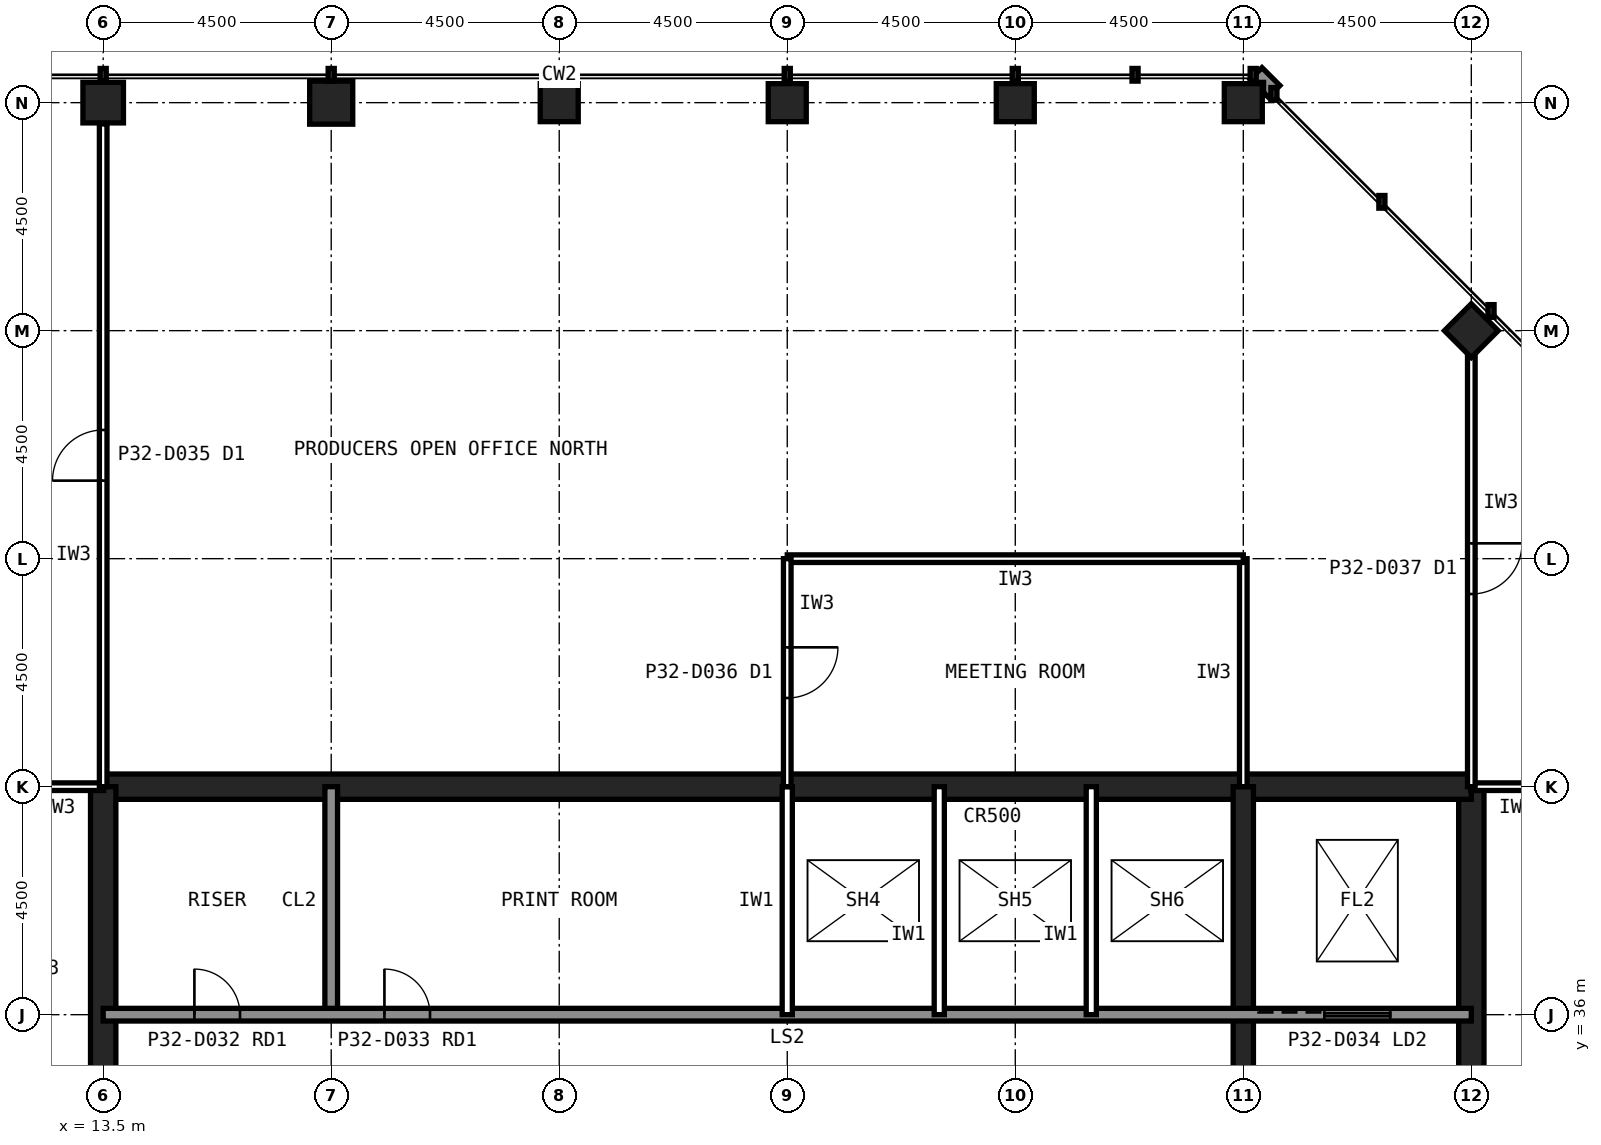
"""IFC4 building model, lengths in metres.
Left out: names, types, materials, properties, quantities, classifications, styles, units other than length and angle.
Written with IfcOpenShell. Run it as: python <this file> out.ifc"""

import sys

from ifc_helpers import new_model, si_unit, direction, frame, frame_2d, origin, origin_2d, place, context, subcontext, project, spatial, rectangle, hollow_rectangle, extrude, element, fill, save


model = new_model("IFC4")
c1 = context("Model", 3, precision=1e-05, world=origin(), true_north=direction((0.0, 1.0)))
c2 = subcontext(c1, "Body", "Model", "MODEL_VIEW")
j1 = project(units=[si_unit("LENGTHUNIT", "METRE"), si_unit("PLANEANGLEUNIT", "RADIAN")], contexts=[c1])
p1 = place(None, origin())
s1 = spatial("IfcSite", under=j1, at=p1, CompositionType="ELEMENT")
p2 = place(p1, origin())
s2 = spatial("IfcBuilding", under=s1, at=p2, CompositionType="ELEMENT")
p3 = place(p2, frame((0.0, 0.0, 135.6)))
s3 = spatial("IfcBuildingStorey", under=s2, at=p3, CompositionType="ELEMENT", Elevation=135.6)
for number, where, z_axis, x_axis in (
    (1, (36.0, 54.0, 0.0), (0.0, 0.0, 1.0), (1.0, 0.0, 0.0)),
    (2, (31.5, 54.0, 0.0), (0.0, 0.0, 1.0), (1.0, 0.0, 0.0)),
    (3, (27.0, 54.0, 0.0), (0.0, 0.0, 1.0), (1.0, 0.0, 0.0)),
    (4, (22.5, 54.0, 0.0), (0.0, 0.0, 1.0), (1.0, 0.0, 0.0)),
):
    element("IfcColumn", number, at=place(p3, frame(where, z_axis=z_axis, x_axis=x_axis)), inside=s3, PredefinedType="COLUMN", context=c2, shape_type="SweptSolid", body=[
        extrude(hollow_rectangle(XDim=0.75, YDim=0.75, WallThickness=0.04, at=origin_2d()), origin(), (0.0, 0.0, 1.0), 4.0),
    ])
p4 = place(p3, frame((18.0, 54.0, 0.0), z_axis=(0.0, 0.0, 1.0), x_axis=(1.0, 0.0, 0.0)))
e5 = element("IfcColumn", 5, at=p4, inside=s3, PredefinedType="COLUMN", context=c2, shape_type="SweptSolid", body=[
    extrude(hollow_rectangle(XDim=0.85, YDim=0.85, WallThickness=0.05, at=origin_2d()), origin(), (0.0, 0.0, 1.0), 4.0),
])
p5 = place(p3, frame((13.5, 54.0, 0.0), z_axis=(0.0, 0.0, 1.0), x_axis=(1.0, 0.0, 0.0)))
e6 = element("IfcColumn", 6, at=p5, inside=s3, PredefinedType="COLUMN", context=c2, shape_type="SweptSolid", body=[
    extrude(hollow_rectangle(XDim=0.8, YDim=0.8, WallThickness=0.045, at=origin_2d()), origin(), (0.0, 0.0, 1.0), 4.0),
])
p6 = place(p3, frame((40.5, 49.5, 0.0), z_axis=(0.0, 0.0, 1.0), x_axis=(0.707106781187, 0.707106781187, 0.0)))
e7 = element("IfcColumn", 7, at=p6, inside=s3, PredefinedType="COLUMN", context=c2, shape_type="SweptSolid", body=[
    extrude(hollow_rectangle(XDim=0.75, YDim=0.75, WallThickness=0.04, at=origin_2d()), origin(), (0.0, 0.0, 1.0), 4.0),
])
p7 = place(p3, frame((40.5, 13.5, 0.0), z_axis=(0.0, 0.0, 1.0), x_axis=(0.0, 1.0, 0.0)))
e8 = element("IfcWall", 8, at=p7, inside=s3, PredefinedType="SHEAR", context=c2, shape_type="SweptSolid", body=[
    extrude(rectangle(XDim=27.0, YDim=0.5, at=frame_2d((13.5, 0.0))), origin(), (0.0, 0.0, 1.0), 4.0),
])
p8 = place(p7, frame((5.85, 0.0, 0.0)))
e9 = element("IfcOpeningElement", 9, at=p8, cuts=e8, PredefinedType="OPENING", context=c2, shape_type="SweptSolid", body=[
    extrude(rectangle(XDim=1.8, YDim=2.1, at=frame_2d((0.9, 1.05))), frame((0.0, 0.26, 0.0), z_axis=(0.0, -1.0, 0.0), x_axis=(1.0, 0.0, 0.0)), (0.0, 0.0, 1.0), 0.52),
])
p9 = place(p7, frame((19.65, 0.0, 0.0)))
e10 = element("IfcOpeningElement", 10, at=p9, cuts=e8, PredefinedType="OPENING", context=c2, shape_type="SweptSolid", body=[
    extrude(rectangle(XDim=1.2, YDim=2.1, at=frame_2d((0.6, 1.05))), frame((0.0, 0.26, 0.0), z_axis=(0.0, -1.0, 0.0), x_axis=(1.0, 0.0, 0.0)), (0.0, 0.0, 1.0), 0.52),
])
p10 = place(p3, frame((40.5, 40.5, 0.0), z_axis=(0.0, 0.0, 1.0), x_axis=(-1.0, 0.0, 0.0)))
e11 = element("IfcWall", 11, at=p10, inside=s3, PredefinedType="SHEAR", context=c2, shape_type="SweptSolid", body=[
    extrude(rectangle(XDim=27.0, YDim=0.5, at=frame_2d((13.5, 0.0))), origin(), (0.0, 0.0, 1.0), 4.0),
])
p11 = place(p3, frame((13.5, 40.5, 0.0), z_axis=(0.0, 0.0, 1.0), x_axis=(0.0, -1.0, 0.0)))
e12 = element("IfcWall", 12, at=p11, inside=s3, PredefinedType="SHEAR", context=c2, shape_type="SweptSolid", body=[
    extrude(rectangle(XDim=27.0, YDim=0.5, at=frame_2d((13.5, 0.0))), origin(), (0.0, 0.0, 1.0), 4.0),
])
p12 = place(p11, frame((19.65, 0.0, 0.0)))
e13 = element("IfcOpeningElement", 13, at=p12, cuts=e12, PredefinedType="OPENING", context=c2, shape_type="SweptSolid", body=[
    extrude(rectangle(XDim=1.2, YDim=2.1, at=frame_2d((0.6, 1.05))), frame((0.0, 0.26, 0.0), z_axis=(0.0, -1.0, 0.0), x_axis=(1.0, 0.0, 0.0)), (0.0, 0.0, 1.0), 0.52),
])
p13 = place(p11, frame((5.85, 0.0, 0.0)))
e14 = element("IfcOpeningElement", 14, at=p13, cuts=e12, PredefinedType="OPENING", context=c2, shape_type="SweptSolid", body=[
    extrude(rectangle(XDim=1.8, YDim=2.1, at=frame_2d((0.9, 1.05))), frame((0.0, 0.26, 0.0), z_axis=(0.0, -1.0, 0.0), x_axis=(1.0, 0.0, 0.0)), (0.0, 0.0, 1.0), 0.52),
])
p14 = place(p3, frame((18.0, 36.0, 0.0), z_axis=(0.0, 0.0, 1.0), x_axis=(0.0, 1.0, 0.0)))
e15 = element("IfcWall", 15, at=p14, inside=s3, PredefinedType="SOLIDWALL", context=c2, shape_type="SweptSolid", body=[
    extrude(rectangle(XDim=4.5, YDim=0.25, at=frame_2d((2.25, 0.0))), origin(), (0.0, 0.0, 1.0), 3.84),
])
p15 = place(p3, frame((36.0, 22.5, 0.0), z_axis=(0.0, 0.0, 1.0), x_axis=(0.0, 1.0, 0.0)))
e16 = element("IfcWall", 16, at=p15, inside=s3, PredefinedType="SHEAR", context=c2, shape_type="SweptSolid", body=[
    extrude(rectangle(XDim=18.0, YDim=0.4, at=frame_2d((9.0, 0.0))), origin(), (0.0, 0.0, 1.0), 4.0),
])
p16 = place(p3, frame((13.5, 36.0, 0.0), z_axis=(0.0, 0.0, 1.0), x_axis=(1.0, 0.0, 0.0)))
e17 = element("IfcWall", 17, at=p16, inside=s3, PredefinedType="SOLIDWALL", context=c2, shape_type="SweptSolid", body=[
    extrude(rectangle(XDim=27.0, YDim=0.25, at=frame_2d((13.5, 0.0))), origin(), (0.0, 0.0, 1.0), 3.84),
])
p17 = place(p16, frame((1.8, 0.0, 0.0)))
e18 = element("IfcOpeningElement", 18, at=p17, cuts=e17, PredefinedType="OPENING", context=c2, shape_type="SweptSolid", body=[
    extrude(rectangle(XDim=0.9, YDim=2.1, at=frame_2d((0.45, 1.05))), frame((0.0, 0.135, 0.0), z_axis=(0.0, -1.0, 0.0), x_axis=(1.0, 0.0, 0.0)), (0.0, 0.0, 1.0), 0.27),
])
p18 = place(p16, frame((5.55, 0.0, 0.0)))
e19 = element("IfcOpeningElement", 19, at=p18, cuts=e17, PredefinedType="OPENING", context=c2, shape_type="SweptSolid", body=[
    extrude(rectangle(XDim=0.9, YDim=2.1, at=frame_2d((0.45, 1.05))), frame((0.0, 0.135, 0.0), z_axis=(0.0, -1.0, 0.0), x_axis=(1.0, 0.0, 0.0)), (0.0, 0.0, 1.0), 0.27),
])
p19 = place(p16, frame((8.55, 0.0, 0.0)))
e20 = element("IfcOpeningElement", 20, at=p19, cuts=e17, PredefinedType="OPENING", context=c2, shape_type="SweptSolid", body=[
    extrude(rectangle(XDim=0.9, YDim=2.1, at=frame_2d((0.45, 1.05))), frame((0.0, 0.135, 0.0), z_axis=(0.0, -1.0, 0.0), x_axis=(1.0, 0.0, 0.0)), (0.0, 0.0, 1.0), 0.27),
])
p20 = place(p16, frame((24.1, 0.0, 0.0)))
e21 = element("IfcOpeningElement", 21, at=p20, cuts=e17, PredefinedType="OPENING", context=c2, shape_type="SweptSolid", body=[
    extrude(rectangle(XDim=1.3, YDim=2.2, at=frame_2d((0.65, 1.1))), frame((0.0, 0.135, 0.0), z_axis=(0.0, -1.0, 0.0), x_axis=(1.0, 0.0, 0.0)), (0.0, 0.0, 1.0), 0.27),
])
for number, where, z_axis, x_axis in (
    (22, (21.0, 36.0, 0.0), (0.0, 0.0, 1.0), (0.0, 1.0, 0.0)),
    (23, (27.0, 36.0, 0.0), (0.0, 0.0, 1.0), (0.0, 1.0, 0.0)),
    (24, (30.0, 36.0, 0.0), (0.0, 0.0, 1.0), (0.0, 1.0, 0.0)),
    (25, (33.0, 36.0, 0.0), (0.0, 0.0, 1.0), (0.0, 1.0, 0.0)),
):
    element("IfcWall", number, at=place(p3, frame(where, z_axis=z_axis, x_axis=x_axis)), inside=s3, PredefinedType="PARTITIONING", context=c2, shape_type="SweptSolid", body=[
        extrude(rectangle(XDim=4.5, YDim=0.2, at=frame_2d((2.25, 0.0))), origin(), (0.0, 0.0, 1.0), 3.84),
    ])
p21 = place(p3, frame((22.5, 42.3, 0.0), z_axis=(0.0, 0.0, 1.0), x_axis=(-1.0, 0.0, 0.0)))
e26 = element("IfcWall", 26, at=p21, inside=s3, PredefinedType="PARTITIONING", context=c2, shape_type="SweptSolid", body=[
    extrude(rectangle(XDim=10.8, YDim=0.15, at=frame_2d((5.4, 0.0))), origin(), (0.0, 0.0, 1.0), 3.84),
])
p22 = place(p21, frame((4.9, 0.0, 0.0)))
e27 = element("IfcOpeningElement", 27, at=p22, cuts=e26, PredefinedType="OPENING", context=c2, shape_type="SweptSolid", body=[
    extrude(rectangle(XDim=1.0, YDim=2.1, at=frame_2d((0.5, 1.05))), frame((0.0, 0.085, 0.0), z_axis=(0.0, -1.0, 0.0), x_axis=(1.0, 0.0, 0.0)), (0.0, 0.0, 1.0), 0.17),
])
p23 = place(p3, frame((42.3, 40.5, 0.0), z_axis=(0.0, 0.0, 1.0), x_axis=(-1.0, 0.0, 0.0)))
e28 = element("IfcWall", 28, at=p23, inside=s3, PredefinedType="PARTITIONING", context=c2, shape_type="SweptSolid", body=[
    extrude(rectangle(XDim=1.81, YDim=0.15, at=frame_2d((0.905, 0.0))), origin(), (0.0, 0.0, 1.0), 2.989),
])
p24 = place(p3, frame((22.5, 40.5, 0.0), z_axis=(0.0, 0.0, 1.0), x_axis=(0.0, 1.0, 0.0)))
e29 = element("IfcWall", 29, at=p24, inside=s3, PredefinedType="PARTITIONING", context=c2, shape_type="SweptSolid", body=[
    extrude(rectangle(XDim=1.8, YDim=0.15, at=frame_2d((0.9, 0.0))), origin(), (0.0, 0.0, 1.0), 2.989),
])
p25 = place(p3, frame((36.0, 40.5, 0.0), z_axis=(0.0, 0.0, 1.0), x_axis=(0.0, 1.0, 0.0)))
e30 = element("IfcWall", 30, at=p25, inside=s3, PredefinedType="PARTITIONING", context=c2, shape_type="SweptSolid", body=[
    extrude(rectangle(XDim=4.5, YDim=0.15, at=frame_2d((2.25, 0.0))), origin(), (0.0, 0.0, 1.0), 2.989),
])
p26 = place(p3, frame((36.0, 45.0, 0.0), z_axis=(0.0, 0.0, 1.0), x_axis=(-1.0, 0.0, 0.0)))
e31 = element("IfcWall", 31, at=p26, inside=s3, PredefinedType="PARTITIONING", context=c2, shape_type="SweptSolid", body=[
    extrude(rectangle(XDim=9.0, YDim=0.15, at=frame_2d((4.5, 0.0))), origin(), (0.0, 0.0, 1.0), 3.84),
])
p27 = place(p3, frame((27.0, 45.0, 0.0), z_axis=(0.0, 0.0, 1.0), x_axis=(0.0, -1.0, 0.0)))
e32 = element("IfcWall", 32, at=p27, inside=s3, PredefinedType="PARTITIONING", context=c2, shape_type="SweptSolid", body=[
    extrude(rectangle(XDim=4.5, YDim=0.15, at=frame_2d((2.25, 0.0))), origin(), (0.0, 0.0, 1.0), 2.989),
])
p28 = place(p27, frame((1.75, 0.0, 0.0)))
e33 = element("IfcOpeningElement", 33, at=p28, cuts=e32, PredefinedType="OPENING", context=c2, shape_type="SweptSolid", body=[
    extrude(rectangle(XDim=1.0, YDim=2.1, at=frame_2d((0.5, 1.05))), frame((0.0, 0.085, 0.0), z_axis=(0.0, -1.0, 0.0), x_axis=(1.0, 0.0, 0.0)), (0.0, 0.0, 1.0), 0.17),
])
p29 = place(p3, frame((40.5, 49.105, 0.0), z_axis=(0.0, 0.0, 1.0), x_axis=(0.0, -1.0, 0.0)))
e34 = element("IfcWall", 34, at=p29, inside=s3, PredefinedType="PARTITIONING", context=c2, shape_type="SweptSolid", body=[
    extrude(rectangle(XDim=8.605, YDim=0.15, at=frame_2d((4.302, 0.0))), origin(), (0.0, 0.0, 1.0), 2.989),
])
p30 = place(p29, frame((3.802, 0.0, 0.0)))
e35 = element("IfcOpeningElement", 35, at=p30, cuts=e34, PredefinedType="OPENING", context=c2, shape_type="SweptSolid", body=[
    extrude(rectangle(XDim=1.0, YDim=2.1, at=frame_2d((0.5, 1.05))), frame((0.0, 0.085, 0.0), z_axis=(0.0, -1.0, 0.0), x_axis=(1.0, 0.0, 0.0)), (0.0, 0.0, 1.0), 0.17),
])
p31 = place(p3, frame((13.5, 42.3, 0.0), z_axis=(0.0, 0.0, 1.0), x_axis=(0.0, 1.0, 0.0)))
e36 = element("IfcWall", 36, at=p31, inside=s3, PredefinedType="PARTITIONING", context=c2, shape_type="SweptSolid", body=[
    extrude(rectangle(XDim=11.28, YDim=0.15, at=frame_2d((5.64, 0.0))), origin(), (0.0, 0.0, 1.0), 2.989),
])
p32 = place(p31, frame((5.14, 0.0, 0.0)))
e37 = element("IfcOpeningElement", 37, at=p32, cuts=e36, PredefinedType="OPENING", context=c2, shape_type="SweptSolid", body=[
    extrude(rectangle(XDim=1.0, YDim=2.1, at=frame_2d((0.5, 1.05))), frame((0.0, 0.085, 0.0), z_axis=(0.0, -1.0, 0.0), x_axis=(1.0, 0.0, 0.0)), (0.0, 0.0, 1.0), 0.17),
])
p33 = place(p17, origin())
e38 = element("IfcDoor", 38, at=p33, inside=s3, OperationType="SINGLE_SWING_LEFT", PredefinedType="DOOR", context=c2, shape_type="SweptSolid", body=[
    extrude(rectangle(XDim=0.9, YDim=2.1, at=frame_2d((0.45, 1.05))), frame((0.0, 0.025, 0.0), z_axis=(0.0, -1.0, 0.0), x_axis=(1.0, 0.0, 0.0)), (0.0, 0.0, 1.0), 0.05),
])
fill(e18, e38)
p34 = place(p18, origin())
e39 = element("IfcDoor", 39, at=p34, inside=s3, OperationType="SINGLE_SWING_LEFT", PredefinedType="DOOR", context=c2, shape_type="SweptSolid", body=[
    extrude(rectangle(XDim=0.9, YDim=2.1, at=frame_2d((0.45, 1.05))), frame((0.0, 0.025, 0.0), z_axis=(0.0, -1.0, 0.0), x_axis=(1.0, 0.0, 0.0)), (0.0, 0.0, 1.0), 0.05),
])
fill(e19, e39)
p35 = place(p19, origin())
e40 = element("IfcDoor", 40, at=p35, inside=s3, OperationType="SINGLE_SWING_LEFT", PredefinedType="DOOR", context=c2, shape_type="SweptSolid", body=[
    extrude(rectangle(XDim=0.9, YDim=2.1, at=frame_2d((0.45, 1.05))), frame((0.0, 0.025, 0.0), z_axis=(0.0, -1.0, 0.0), x_axis=(1.0, 0.0, 0.0)), (0.0, 0.0, 1.0), 0.05),
])
fill(e20, e40)
p36 = place(p20, origin())
e41 = element("IfcDoor", 41, at=p36, inside=s3, OperationType="SLIDING_TO_LEFT", PredefinedType="DOOR", context=c2, shape_type="SweptSolid", body=[
    extrude(rectangle(XDim=1.3, YDim=2.2, at=frame_2d((0.65, 1.1))), frame((0.0, 0.025, 0.0), z_axis=(0.0, -1.0, 0.0), x_axis=(1.0, 0.0, 0.0)), (0.0, 0.0, 1.0), 0.05),
])
fill(e21, e41)
p37 = place(p22, origin())
e42 = element("IfcDoor", 42, at=p37, inside=s3, OperationType="SINGLE_SWING_LEFT", PredefinedType="DOOR", context=c2, shape_type="SweptSolid", body=[
    extrude(rectangle(XDim=1.0, YDim=2.1, at=frame_2d((0.5, 1.05))), frame((0.0, 0.025, 0.0), z_axis=(0.0, -1.0, 0.0), x_axis=(1.0, 0.0, 0.0)), (0.0, 0.0, 1.0), 0.05),
])
fill(e27, e42)
p38 = place(p28, origin())
e43 = element("IfcDoor", 43, at=p38, inside=s3, OperationType="SINGLE_SWING_LEFT", PredefinedType="DOOR", context=c2, shape_type="SweptSolid", body=[
    extrude(rectangle(XDim=1.0, YDim=2.1, at=frame_2d((0.5, 1.05))), frame((0.0, 0.025, 0.0), z_axis=(0.0, -1.0, 0.0), x_axis=(1.0, 0.0, 0.0)), (0.0, 0.0, 1.0), 0.05),
])
fill(e33, e43)
p39 = place(p30, origin())
e44 = element("IfcDoor", 44, at=p39, inside=s3, OperationType="SINGLE_SWING_LEFT", PredefinedType="DOOR", context=c2, shape_type="SweptSolid", body=[
    extrude(rectangle(XDim=1.0, YDim=2.1, at=frame_2d((0.5, 1.05))), frame((0.0, 0.025, 0.0), z_axis=(0.0, -1.0, 0.0), x_axis=(1.0, 0.0, 0.0)), (0.0, 0.0, 1.0), 0.05),
])
fill(e35, e44)
p40 = place(p32, origin())
e45 = element("IfcDoor", 45, at=p40, inside=s3, OperationType="SINGLE_SWING_LEFT", PredefinedType="DOOR", context=c2, shape_type="SweptSolid", body=[
    extrude(rectangle(XDim=1.0, YDim=2.1, at=frame_2d((0.5, 1.05))), frame((0.0, 0.025, 0.0), z_axis=(0.0, -1.0, 0.0), x_axis=(1.0, 0.0, 0.0)), (0.0, 0.0, 1.0), 0.05),
])
fill(e37, e45)
save(model, sys.argv[1])
